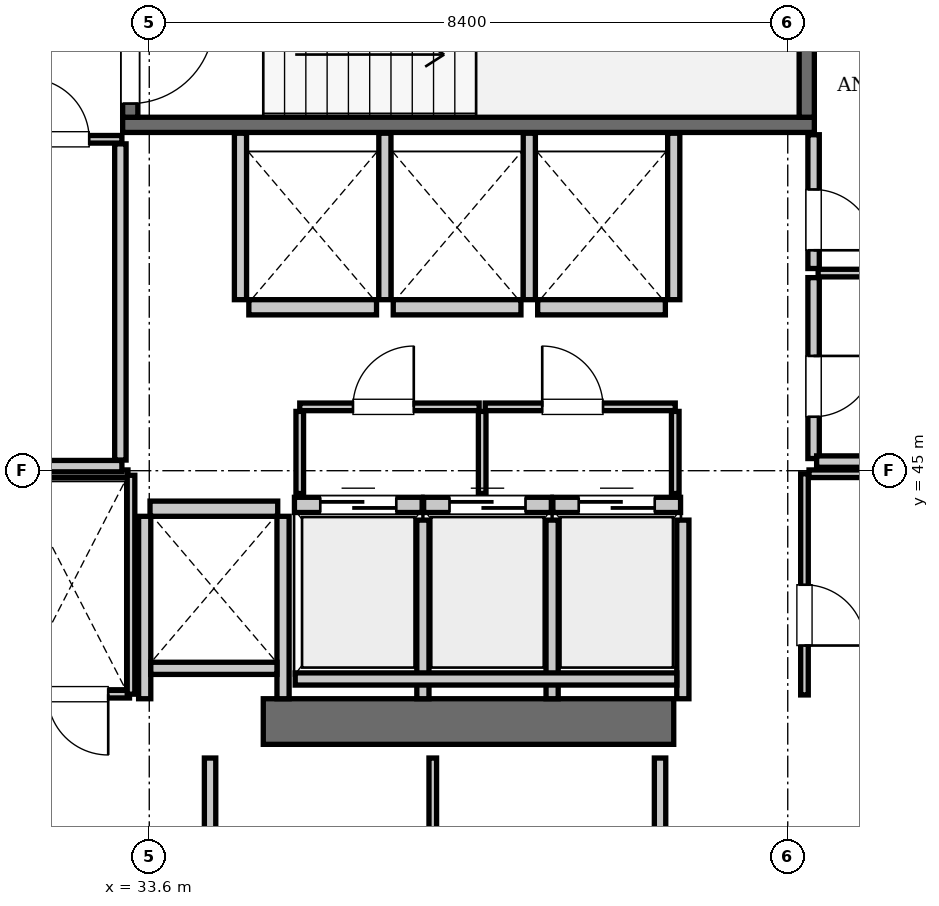
"""IFC4 building model, lengths in metres.
Left out: names, types, materials, properties, quantities, classifications, styles, units other than length and angle.
Written with IfcOpenShell. Run it as: python <this file> out.ifc"""

import sys

from ifc_helpers import new_model, si_unit, direction, frame, frame_2d, origin, place, context, subcontext, project, spatial, rectangle, extrude, element, fill, save


model = new_model("IFC4")
c1 = context("Model", 3, precision=1e-05, world=origin(), true_north=direction((0.0, 1.0)))
c2 = subcontext(c1, "Body", "Model", "MODEL_VIEW")
j1 = project(units=[si_unit("LENGTHUNIT", "METRE"), si_unit("PLANEANGLEUNIT", "RADIAN")], contexts=[c1])
p1 = place(None, origin())
s1 = spatial("IfcSite", under=j1, at=p1, CompositionType="ELEMENT")
p2 = place(p1, origin())
s2 = spatial("IfcBuilding", under=s1, at=p2, CompositionType="ELEMENT")
p3 = place(p2, frame((0.0, 0.0, 277.9)))
s3 = spatial("IfcBuildingStorey", under=s2, at=p3, CompositionType="ELEMENT", Elevation=277.9)
p4 = place(p3, frame((35.1, 41.7, 0.0), z_axis=(0.0, 0.0, 1.0), x_axis=(1.0, 0.0, 0.0)))
e1 = element("IfcWall", 1, at=p4, inside=s3, PredefinedType="SHEAR", context=c2, shape_type="SweptSolid", body=[
    extrude(rectangle(XDim=5.4, YDim=0.6, at=frame_2d((2.7, 0.0))), origin(), (0.0, 0.0, 1.0), 3.85),
])
p5 = place(p3, frame((33.25, 49.55, 0.0), z_axis=(0.0, 0.0, 1.0), x_axis=(1.0, 0.0, 0.0)))
e2 = element("IfcWall", 2, at=p5, inside=s3, PredefinedType="SOLIDWALL", context=c2, shape_type="SweptSolid", body=[
    extrude(rectangle(XDim=9.1, YDim=0.2, at=frame_2d((4.55, 0.0))), origin(), (0.0, 0.0, 1.0), 3.61),
])
p6 = place(p3, frame((42.25, 49.65, 0.0), z_axis=(0.0, 0.0, 1.0), x_axis=(0.0, 1.0, 0.0)))
e3 = element("IfcWall", 3, at=p6, inside=s3, PredefinedType="SOLIDWALL", context=c2, shape_type="SweptSolid", body=[
    extrude(rectangle(XDim=3.75, YDim=0.2, at=frame_2d((1.875, 0.0))), origin(), (0.0, 0.0, 1.0), 3.61),
])
p7 = place(p3, frame((33.35, 49.65, 0.0), z_axis=(0.0, 0.0, 1.0), x_axis=(0.0, 1.0, 0.0)))
e4 = element("IfcWall", 4, at=p7, inside=s3, PredefinedType="SOLIDWALL", context=c2, shape_type="SweptSolid", body=[
    extrude(rectangle(XDim=3.75, YDim=0.2, at=frame_2d((1.875, 0.0))), origin(), (0.0, 0.0, 1.0), 3.61),
])
p8 = place(p7, frame((0.18, 0.0, 0.0)))
e5 = element("IfcOpeningElement", 5, at=p8, cuts=e4, PredefinedType="OPENING", context=c2, shape_type="SweptSolid", body=[
    extrude(rectangle(XDim=1.1, YDim=2.15, at=frame_2d((0.55, 1.075))), frame((0.0, 0.11, 0.0), z_axis=(0.0, -1.0, 0.0), x_axis=(1.0, 0.0, 0.0)), (0.0, 0.0, 1.0), 0.22),
])
p9 = place(p3, frame((35.51, 44.55, 0.0), z_axis=(0.0, 0.0, 1.0), x_axis=(1.0, 0.0, 0.0)))
e6 = element("IfcWall", 6, at=p9, inside=s3, PredefinedType="SOLIDWALL", context=c2, shape_type="SweptSolid", body=[
    extrude(rectangle(XDim=1.68, YDim=0.2, at=frame_2d((0.84, 0.0))), origin(), (0.0, 0.0, 1.0), 3.61),
])
p10 = place(p9, frame((0.34, 0.0, 0.0)))
e7 = element("IfcOpeningElement", 7, at=p10, cuts=e6, PredefinedType="OPENING", context=c2, shape_type="SweptSolid", body=[
    extrude(rectangle(XDim=1.0, YDim=2.15, at=frame_2d((0.5, 1.075))), frame((0.0, 0.11, 0.0), z_axis=(0.0, -1.0, 0.0), x_axis=(1.0, 0.0, 0.0)), (0.0, 0.0, 1.0), 0.22),
])
p11 = place(p3, frame((37.21, 44.55, 0.0), z_axis=(0.0, 0.0, 1.0), x_axis=(1.0, 0.0, 0.0)))
e8 = element("IfcWall", 8, at=p11, inside=s3, PredefinedType="SOLIDWALL", context=c2, shape_type="SweptSolid", body=[
    extrude(rectangle(XDim=1.68, YDim=0.2, at=frame_2d((0.84, 0.0))), origin(), (0.0, 0.0, 1.0), 3.61),
])
p12 = place(p11, frame((0.34, 0.0, 0.0)))
e9 = element("IfcOpeningElement", 9, at=p12, cuts=e8, PredefinedType="OPENING", context=c2, shape_type="SweptSolid", body=[
    extrude(rectangle(XDim=1.0, YDim=2.15, at=frame_2d((0.5, 1.075))), frame((0.0, 0.11, 0.0), z_axis=(0.0, -1.0, 0.0), x_axis=(1.0, 0.0, 0.0)), (0.0, 0.0, 1.0), 0.22),
])
p13 = place(p3, frame((38.91, 44.55, 0.0), z_axis=(0.0, 0.0, 1.0), x_axis=(1.0, 0.0, 0.0)))
e10 = element("IfcWall", 10, at=p13, inside=s3, PredefinedType="SOLIDWALL", context=c2, shape_type="SweptSolid", body=[
    extrude(rectangle(XDim=1.68, YDim=0.2, at=frame_2d((0.84, 0.0))), origin(), (0.0, 0.0, 1.0), 3.61),
])
p14 = place(p13, frame((0.34, 0.0, 0.0)))
e11 = element("IfcOpeningElement", 11, at=p14, cuts=e10, PredefinedType="OPENING", context=c2, shape_type="SweptSolid", body=[
    extrude(rectangle(XDim=1.0, YDim=2.15, at=frame_2d((0.5, 1.075))), frame((0.0, 0.11, 0.0), z_axis=(0.0, -1.0, 0.0), x_axis=(1.0, 0.0, 0.0)), (0.0, 0.0, 1.0), 0.22),
])
p15 = place(p3, frame((34.91, 47.15, 0.0), z_axis=(0.0, 0.0, 1.0), x_axis=(1.0, 0.0, 0.0)))
e12 = element("IfcWall", 12, at=p15, inside=s3, PredefinedType="SOLIDWALL", context=c2, shape_type="SweptSolid", body=[
    extrude(rectangle(XDim=1.68, YDim=0.2, at=frame_2d((0.84, 0.0))), origin(), (0.0, 0.0, 1.0), 3.61),
])
for number, where, z_axis, x_axis in (
    (13, (36.81, 47.15, 0.0), (0.0, 0.0, 1.0), (1.0, 0.0, 0.0)),
    (14, (38.71, 47.15, 0.0), (0.0, 0.0, 1.0), (1.0, 0.0, 0.0)),
    (15, (33.61, 44.5, 0.0), (0.0, 0.0, 1.0), (1.0, 0.0, 0.0)),
):
    element("IfcWall", number, at=place(p3, frame(where, z_axis=z_axis, x_axis=x_axis)), inside=s3, PredefinedType="SOLIDWALL", context=c2, shape_type="SweptSolid", body=[
        extrude(rectangle(XDim=1.68, YDim=0.2, at=frame_2d((0.84, 0.0))), origin(), (0.0, 0.0, 1.0), 3.61),
    ])
for number, where, z_axis, x_axis in (
    (16, (37.2, 42.0, 0.0), (0.0, 0.0, 1.0), (0.0, 1.0, 0.0)),
    (17, (38.9, 42.0, 0.0), (0.0, 0.0, 1.0), (0.0, 1.0, 0.0)),
    (18, (40.62, 42.0, 0.0), (0.0, 0.0, 1.0), (0.0, 1.0, 0.0)),
):
    element("IfcWall", number, at=place(p3, frame(where, z_axis=z_axis, x_axis=x_axis)), inside=s3, PredefinedType="SOLIDWALL", context=c2, shape_type="SweptSolid", body=[
        extrude(rectangle(XDim=2.35, YDim=0.16, at=frame_2d((1.175, 0.0))), origin(), (0.0, 0.0, 1.0), 3.61),
    ])
p16 = place(p3, frame((35.52, 42.26, 0.0), z_axis=(0.0, 0.0, 1.0), x_axis=(1.0, 0.0, 0.0)))
e19 = element("IfcWall", 19, at=p16, inside=s3, PredefinedType="SOLIDWALL", context=c2, shape_type="SweptSolid", body=[
    extrude(rectangle(XDim=5.02, YDim=0.16, at=frame_2d((2.51, 0.0))), origin(), (0.0, 0.0, 1.0), 3.61),
])
for number, where, z_axis, x_axis in (
    (20, (34.8, 47.25, 0.0), (0.0, 0.0, 1.0), (0.0, 1.0, 0.0)),
    (21, (36.7, 47.25, 0.0), (0.0, 0.0, 1.0), (0.0, 1.0, 0.0)),
    (22, (38.6, 47.25, 0.0), (0.0, 0.0, 1.0), (0.0, 1.0, 0.0)),
    (23, (40.5, 47.25, 0.0), (0.0, 0.0, 1.0), (0.0, 1.0, 0.0)),
):
    element("IfcWall", number, at=place(p3, frame(where, z_axis=z_axis, x_axis=x_axis)), inside=s3, PredefinedType="SOLIDWALL", context=c2, shape_type="SweptSolid", body=[
        extrude(rectangle(XDim=2.19, YDim=0.16, at=frame_2d((1.095, 0.0))), origin(), (0.0, 0.0, 1.0), 3.61),
    ])
for number, where, z_axis, x_axis in (
    (24, (33.54, 42.0, 0.0), (0.0, 0.0, 1.0), (0.0, 1.0, 0.0)),
    (25, (35.36, 42.0, 0.0), (0.0, 0.0, 1.0), (0.0, 1.0, 0.0)),
):
    element("IfcWall", number, at=place(p3, frame(where, z_axis=z_axis, x_axis=x_axis)), inside=s3, PredefinedType="SOLIDWALL", context=c2, shape_type="SweptSolid", body=[
        extrude(rectangle(XDim=2.4, YDim=0.16, at=frame_2d((1.2, 0.0))), origin(), (0.0, 0.0, 1.0), 3.61),
    ])
p17 = place(p3, frame((33.62, 42.4, 0.0), z_axis=(0.0, 0.0, 1.0), x_axis=(1.0, 0.0, 0.0)))
e26 = element("IfcWall", 26, at=p17, inside=s3, PredefinedType="SOLIDWALL", context=c2, shape_type="SweptSolid", body=[
    extrude(rectangle(XDim=1.66, YDim=0.16, at=frame_2d((0.83, 0.0))), origin(), (0.0, 0.0, 1.0), 3.61),
])
p18 = place(p3, frame((32.02, 42.06, 0.0), z_axis=(0.0, 0.0, 1.0), x_axis=(1.0, 0.0, 0.0)))
e27 = element("IfcWall", 27, at=p18, inside=s3, PredefinedType="PARTITIONING", context=c2, shape_type="SweptSolid", body=[
    extrude(rectangle(XDim=1.32, YDim=0.1, at=frame_2d((0.66, 0.0))), origin(), (0.0, 0.0, 1.0), 3.61),
])
p19 = place(p18, frame((0.24, 0.0, 0.0)))
e28 = element("IfcOpeningElement", 28, at=p19, cuts=e27, PredefinedType="OPENING", context=c2, shape_type="SweptSolid", body=[
    extrude(rectangle(XDim=0.8, YDim=2.05, at=frame_2d((0.4, 1.025))), frame((0.0, 0.06, 0.0), z_axis=(0.0, -1.0, 0.0), x_axis=(1.0, 0.0, 0.0)), (0.0, 0.0, 1.0), 0.12),
])
p20 = place(p3, frame((31.84, 44.96, 0.0), z_axis=(0.0, 0.0, 1.0), x_axis=(1.0, 0.0, 0.0)))
e29 = element("IfcWall", 29, at=p20, inside=s3, PredefinedType="PARTITIONING", context=c2, shape_type="SweptSolid", body=[
    extrude(rectangle(XDim=1.48, YDim=0.1, at=frame_2d((0.74, 0.0))), origin(), (0.0, 0.0, 1.0), 3.61),
])
p21 = place(p3, frame((33.36, 42.06, 0.0), z_axis=(0.0, 0.0, 1.0), x_axis=(0.0, 1.0, 0.0)))
e30 = element("IfcWall", 30, at=p21, inside=s3, PredefinedType="PARTITIONING", context=c2, shape_type="SweptSolid", body=[
    extrude(rectangle(XDim=2.88, YDim=0.1, at=frame_2d((1.44, 0.0))), origin(), (0.0, 0.0, 1.0), 3.61),
])
p22 = place(p3, frame((35.58, 45.84, 0.0), z_axis=(0.0, 0.0, 1.0), x_axis=(1.0, 0.0, 0.0)))
e31 = element("IfcWall", 31, at=p22, inside=s3, PredefinedType="PARTITIONING", context=c2, shape_type="SweptSolid", body=[
    extrude(rectangle(XDim=2.36, YDim=0.1, at=frame_2d((1.18, 0.0))), origin(), (0.0, 0.0, 1.0), 3.61),
])
p23 = place(p22, frame((0.7, 0.0, 0.0)))
e32 = element("IfcOpeningElement", 32, at=p23, cuts=e31, PredefinedType="OPENING", context=c2, shape_type="SweptSolid", body=[
    extrude(rectangle(XDim=0.8, YDim=2.05, at=frame_2d((0.4, 1.025))), frame((0.0, 0.06, 0.0), z_axis=(0.0, -1.0, 0.0), x_axis=(1.0, 0.0, 0.0)), (0.0, 0.0, 1.0), 0.12),
])
p24 = place(p3, frame((38.02, 45.84, 0.0), z_axis=(0.0, 0.0, 1.0), x_axis=(1.0, 0.0, 0.0)))
e33 = element("IfcWall", 33, at=p24, inside=s3, PredefinedType="PARTITIONING", context=c2, shape_type="SweptSolid", body=[
    extrude(rectangle(XDim=2.5, YDim=0.1, at=frame_2d((1.25, 0.0))), origin(), (0.0, 0.0, 1.0), 3.61),
])
p25 = place(p24, frame((0.75, 0.0, 0.0)))
e34 = element("IfcOpeningElement", 34, at=p25, cuts=e33, PredefinedType="OPENING", context=c2, shape_type="SweptSolid", body=[
    extrude(rectangle(XDim=0.8, YDim=2.05, at=frame_2d((0.4, 1.025))), frame((0.0, 0.06, 0.0), z_axis=(0.0, -1.0, 0.0), x_axis=(1.0, 0.0, 0.0)), (0.0, 0.0, 1.0), 0.12),
])
for number, where, z_axis, x_axis in (
    (35, (35.58, 44.7, 0.0), (0.0, 0.0, 1.0), (0.0, 1.0, 0.0)),
    (36, (37.98, 44.7, 0.0), (0.0, 0.0, 1.0), (0.0, 1.0, 0.0)),
    (37, (40.52, 44.7, 0.0), (0.0, 0.0, 1.0), (0.0, 1.0, 0.0)),
):
    element("IfcWall", number, at=place(p3, frame(where, z_axis=z_axis, x_axis=x_axis)), inside=s3, PredefinedType="PARTITIONING", context=c2, shape_type="SweptSolid", body=[
        extrude(rectangle(XDim=1.08, YDim=0.1, at=frame_2d((0.54, 0.0))), origin(), (0.0, 0.0, 1.0), 3.61),
    ])
p26 = place(p3, frame((42.22, 42.05, 0.0), z_axis=(0.0, 0.0, 1.0), x_axis=(0.0, 1.0, 0.0)))
e38 = element("IfcWall", 38, at=p26, inside=s3, PredefinedType="PARTITIONING", context=c2, shape_type="SweptSolid", body=[
    extrude(rectangle(XDim=2.91, YDim=0.1, at=frame_2d((1.455, 0.0))), origin(), (0.0, 0.0, 1.0), 3.61),
])
p27 = place(p26, frame((0.65, 0.0, 0.0)))
e39 = element("IfcOpeningElement", 39, at=p27, cuts=e38, PredefinedType="OPENING", context=c2, shape_type="SweptSolid", body=[
    extrude(rectangle(XDim=0.8, YDim=2.05, at=frame_2d((0.4, 1.025))), frame((0.0, 0.06, 0.0), z_axis=(0.0, -1.0, 0.0), x_axis=(1.0, 0.0, 0.0)), (0.0, 0.0, 1.0), 0.12),
])
p28 = place(p3, frame((42.28, 44.96, 0.0), z_axis=(0.0, 0.0, 1.0), x_axis=(1.0, 0.0, 0.0)))
e40 = element("IfcWall", 40, at=p28, inside=s3, PredefinedType="PARTITIONING", context=c2, shape_type="SweptSolid", body=[
    extrude(rectangle(XDim=1.3, YDim=0.1, at=frame_2d((0.65, 0.0))), origin(), (0.0, 0.0, 1.0), 3.61),
])
p29 = place(p3, frame((30.06, 45.06, 0.0), z_axis=(0.0, 0.0, 1.0), x_axis=(1.0, 0.0, 0.0)))
e41 = element("IfcWall", 41, at=p29, inside=s3, PredefinedType="PARTITIONING", context=c2, shape_type="SweptSolid", body=[
    extrude(rectangle(XDim=3.18, YDim=0.15, at=frame_2d((1.59, 0.0))), origin(), (0.0, 0.0, 1.0), 3.61),
])
p30 = place(p3, frame((33.22, 45.14, 0.0), z_axis=(0.0, 0.0, 1.0), x_axis=(0.0, 1.0, 0.0)))
e42 = element("IfcWall", 42, at=p30, inside=s3, PredefinedType="PARTITIONING", context=c2, shape_type="SweptSolid", body=[
    extrude(rectangle(XDim=4.16, YDim=0.15, at=frame_2d((2.08, 0.0))), origin(), (0.0, 0.0, 1.0), 3.61),
])
p31 = place(p3, frame((30.06, 49.36, 0.0), z_axis=(0.0, 0.0, 1.0), x_axis=(1.0, 0.0, 0.0)))
e43 = element("IfcWall", 43, at=p31, inside=s3, PredefinedType="PARTITIONING", context=c2, shape_type="SweptSolid", body=[
    extrude(rectangle(XDim=3.18, YDim=0.1, at=frame_2d((1.59, 0.0))), origin(), (0.0, 0.0, 1.0), 3.61),
])
p32 = place(p31, frame((1.95, 0.0, 0.0)))
e44 = element("IfcOpeningElement", 44, at=p32, cuts=e43, PredefinedType="OPENING", context=c2, shape_type="SweptSolid", body=[
    extrude(rectangle(XDim=0.8, YDim=2.05, at=frame_2d((0.4, 1.025))), frame((0.0, 0.06, 0.0), z_axis=(0.0, -1.0, 0.0), x_axis=(1.0, 0.0, 0.0)), (0.0, 0.0, 1.0), 0.12),
])
p33 = place(p3, frame((42.34, 45.16, 0.0), z_axis=(0.0, 0.0, 1.0), x_axis=(0.0, 1.0, 0.0)))
e45 = element("IfcWall", 45, at=p33, inside=s3, PredefinedType="PARTITIONING", context=c2, shape_type="SweptSolid", body=[
    extrude(rectangle(XDim=2.38, YDim=0.15, at=frame_2d((1.19, 0.0))), origin(), (0.0, 0.0, 1.0), 3.61),
])
p34 = place(p33, frame((0.55, 0.0, 0.0)))
e46 = element("IfcOpeningElement", 46, at=p34, cuts=e45, PredefinedType="OPENING", context=c2, shape_type="SweptSolid", body=[
    extrude(rectangle(XDim=0.8, YDim=2.05, at=frame_2d((0.4, 1.025))), frame((0.0, 0.085, 0.0), z_axis=(0.0, -1.0, 0.0), x_axis=(1.0, 0.0, 0.0)), (0.0, 0.0, 1.0), 0.17),
])
p35 = place(p3, frame((42.34, 47.66, 0.0), z_axis=(0.0, 0.0, 1.0), x_axis=(0.0, 1.0, 0.0)))
e47 = element("IfcWall", 47, at=p35, inside=s3, PredefinedType="PARTITIONING", context=c2, shape_type="SweptSolid", body=[
    extrude(rectangle(XDim=1.76, YDim=0.15, at=frame_2d((0.88, 0.0))), origin(), (0.0, 0.0, 1.0), 3.61),
])
p36 = place(p35, frame((0.24, 0.0, 0.0)))
e48 = element("IfcOpeningElement", 48, at=p36, cuts=e47, PredefinedType="OPENING", context=c2, shape_type="SweptSolid", body=[
    extrude(rectangle(XDim=0.8, YDim=2.05, at=frame_2d((0.4, 1.025))), frame((0.0, 0.085, 0.0), z_axis=(0.0, -1.0, 0.0), x_axis=(1.0, 0.0, 0.0)), (0.0, 0.0, 1.0), 0.17),
])
p37 = place(p3, frame((42.4, 47.6, 0.0), z_axis=(0.0, 0.0, 1.0), x_axis=(1.0, 0.0, 0.0)))
e49 = element("IfcWall", 49, at=p37, inside=s3, PredefinedType="PARTITIONING", context=c2, shape_type="SweptSolid", body=[
    extrude(rectangle(XDim=3.1, YDim=0.1, at=frame_2d((1.55, 0.0))), origin(), (0.0, 0.0, 1.0), 3.61),
])
p38 = place(p3, frame((42.38, 45.12, 0.0), z_axis=(0.0, 0.0, 1.0), x_axis=(1.0, 0.0, 0.0)))
e50 = element("IfcWall", 50, at=p38, inside=s3, PredefinedType="PARTITIONING", context=c2, shape_type="SweptSolid", body=[
    extrude(rectangle(XDim=3.14, YDim=0.15, at=frame_2d((1.57, 0.0))), origin(), (0.0, 0.0, 1.0), 3.61),
])
p39 = place(p3, frame((34.4, 38.38, 0.0), z_axis=(0.0, 0.0, 1.0), x_axis=(0.0, 1.0, 0.0)))
e51 = element("IfcWall", 51, at=p39, inside=s3, PredefinedType="PARTITIONING", context=c2, shape_type="SweptSolid", body=[
    extrude(rectangle(XDim=2.84, YDim=0.15, at=frame_2d((1.42, 0.0))), origin(), (0.0, 0.0, 1.0), 3.61),
])
p40 = place(p3, frame((37.33, 38.38, 0.0), z_axis=(0.0, 0.0, 1.0), x_axis=(0.0, 1.0, 0.0)))
e52 = element("IfcWall", 52, at=p40, inside=s3, PredefinedType="PARTITIONING", context=c2, shape_type="SweptSolid", body=[
    extrude(rectangle(XDim=2.84, YDim=0.1, at=frame_2d((1.42, 0.0))), origin(), (0.0, 0.0, 1.0), 3.61),
])
p41 = place(p3, frame((40.32, 38.38, 0.0), z_axis=(0.0, 0.0, 1.0), x_axis=(0.0, 1.0, 0.0)))
e53 = element("IfcWall", 53, at=p41, inside=s3, PredefinedType="PARTITIONING", context=c2, shape_type="SweptSolid", body=[
    extrude(rectangle(XDim=2.84, YDim=0.15, at=frame_2d((1.42, 0.0))), origin(), (0.0, 0.0, 1.0), 3.61),
])
p42 = place(p8, frame((1.1, 0.0, 0.0), z_axis=(0.0, 0.0, 1.0), x_axis=(-1.0, 0.0, 0.0)))
e54 = element("IfcDoor", 54, at=p42, inside=s3, OperationType="SINGLE_SWING_LEFT", PredefinedType="DOOR", context=c2, shape_type="SweptSolid", body=[
    extrude(rectangle(XDim=1.1, YDim=2.15, at=frame_2d((0.55, 1.075))), frame((0.0, 0.025, 0.0), z_axis=(0.0, -1.0, 0.0), x_axis=(1.0, 0.0, 0.0)), (0.0, 0.0, 1.0), 0.05),
])
fill(e5, e54)
p43 = place(p10, origin())
e55 = element("IfcDoor", 55, at=p43, inside=s3, OperationType="SLIDING_TO_LEFT", PredefinedType="DOOR", context=c2, shape_type="SweptSolid", body=[
    extrude(rectangle(XDim=1.0, YDim=2.15, at=frame_2d((0.5, 1.075))), frame((0.0, 0.025, 0.0), z_axis=(0.0, -1.0, 0.0), x_axis=(1.0, 0.0, 0.0)), (0.0, 0.0, 1.0), 0.05),
])
fill(e7, e55)
p44 = place(p12, origin())
e56 = element("IfcDoor", 56, at=p44, inside=s3, OperationType="SLIDING_TO_LEFT", PredefinedType="DOOR", context=c2, shape_type="SweptSolid", body=[
    extrude(rectangle(XDim=1.0, YDim=2.15, at=frame_2d((0.5, 1.075))), frame((0.0, 0.025, 0.0), z_axis=(0.0, -1.0, 0.0), x_axis=(1.0, 0.0, 0.0)), (0.0, 0.0, 1.0), 0.05),
])
fill(e9, e56)
p45 = place(p14, origin())
e57 = element("IfcDoor", 57, at=p45, inside=s3, OperationType="SLIDING_TO_LEFT", PredefinedType="DOOR", context=c2, shape_type="SweptSolid", body=[
    extrude(rectangle(XDim=1.0, YDim=2.15, at=frame_2d((0.5, 1.075))), frame((0.0, 0.025, 0.0), z_axis=(0.0, -1.0, 0.0), x_axis=(1.0, 0.0, 0.0)), (0.0, 0.0, 1.0), 0.05),
])
fill(e11, e57)
p46 = place(p19, frame((0.8, 0.0, 0.0), z_axis=(0.0, 0.0, 1.0), x_axis=(-1.0, 0.0, 0.0)))
e58 = element("IfcDoor", 58, at=p46, inside=s3, OperationType="SINGLE_SWING_LEFT", PredefinedType="DOOR", context=c2, shape_type="SweptSolid", body=[
    extrude(rectangle(XDim=0.8, YDim=2.05, at=frame_2d((0.4, 1.025))), frame((0.0, 0.025, 0.0), z_axis=(0.0, -1.0, 0.0), x_axis=(1.0, 0.0, 0.0)), (0.0, 0.0, 1.0), 0.05),
])
fill(e28, e58)
p47 = place(p23, origin())
e59 = element("IfcDoor", 59, at=p47, inside=s3, OperationType="SINGLE_SWING_RIGHT", PredefinedType="DOOR", context=c2, shape_type="SweptSolid", body=[
    extrude(rectangle(XDim=0.8, YDim=2.05, at=frame_2d((0.4, 1.025))), frame((0.0, 0.025, 0.0), z_axis=(0.0, -1.0, 0.0), x_axis=(1.0, 0.0, 0.0)), (0.0, 0.0, 1.0), 0.05),
])
fill(e32, e59)
p48 = place(p25, origin())
e60 = element("IfcDoor", 60, at=p48, inside=s3, OperationType="SINGLE_SWING_LEFT", PredefinedType="DOOR", context=c2, shape_type="SweptSolid", body=[
    extrude(rectangle(XDim=0.8, YDim=2.05, at=frame_2d((0.4, 1.025))), frame((0.0, 0.025, 0.0), z_axis=(0.0, -1.0, 0.0), x_axis=(1.0, 0.0, 0.0)), (0.0, 0.0, 1.0), 0.05),
])
fill(e34, e60)
p49 = place(p27, frame((0.8, 0.0, 0.0), z_axis=(0.0, 0.0, 1.0), x_axis=(-1.0, 0.0, 0.0)))
e61 = element("IfcDoor", 61, at=p49, inside=s3, OperationType="SINGLE_SWING_RIGHT", PredefinedType="DOOR", context=c2, shape_type="SweptSolid", body=[
    extrude(rectangle(XDim=0.8, YDim=2.05, at=frame_2d((0.4, 1.025))), frame((0.0, 0.025, 0.0), z_axis=(0.0, -1.0, 0.0), x_axis=(1.0, 0.0, 0.0)), (0.0, 0.0, 1.0), 0.05),
])
fill(e39, e61)
p50 = place(p32, origin())
e62 = element("IfcDoor", 62, at=p50, inside=s3, OperationType="SINGLE_SWING_LEFT", PredefinedType="DOOR", context=c2, shape_type="SweptSolid", body=[
    extrude(rectangle(XDim=0.8, YDim=2.05, at=frame_2d((0.4, 1.025))), frame((0.0, 0.025, 0.0), z_axis=(0.0, -1.0, 0.0), x_axis=(1.0, 0.0, 0.0)), (0.0, 0.0, 1.0), 0.05),
])
fill(e44, e62)
p51 = place(p34, frame((0.8, 0.0, 0.0), z_axis=(0.0, 0.0, 1.0), x_axis=(-1.0, 0.0, 0.0)))
e63 = element("IfcDoor", 63, at=p51, inside=s3, OperationType="SINGLE_SWING_LEFT", PredefinedType="DOOR", context=c2, shape_type="SweptSolid", body=[
    extrude(rectangle(XDim=0.8, YDim=2.05, at=frame_2d((0.4, 1.025))), frame((0.0, 0.025, 0.0), z_axis=(0.0, -1.0, 0.0), x_axis=(1.0, 0.0, 0.0)), (0.0, 0.0, 1.0), 0.05),
])
fill(e46, e63)
p52 = place(p36, frame((0.8, 0.0, 0.0), z_axis=(0.0, 0.0, 1.0), x_axis=(-1.0, 0.0, 0.0)))
e64 = element("IfcDoor", 64, at=p52, inside=s3, OperationType="SINGLE_SWING_RIGHT", PredefinedType="DOOR", context=c2, shape_type="SweptSolid", body=[
    extrude(rectangle(XDim=0.8, YDim=2.05, at=frame_2d((0.4, 1.025))), frame((0.0, 0.025, 0.0), z_axis=(0.0, -1.0, 0.0), x_axis=(1.0, 0.0, 0.0)), (0.0, 0.0, 1.0), 0.05),
])
fill(e48, e64)
save(model, sys.argv[1])
